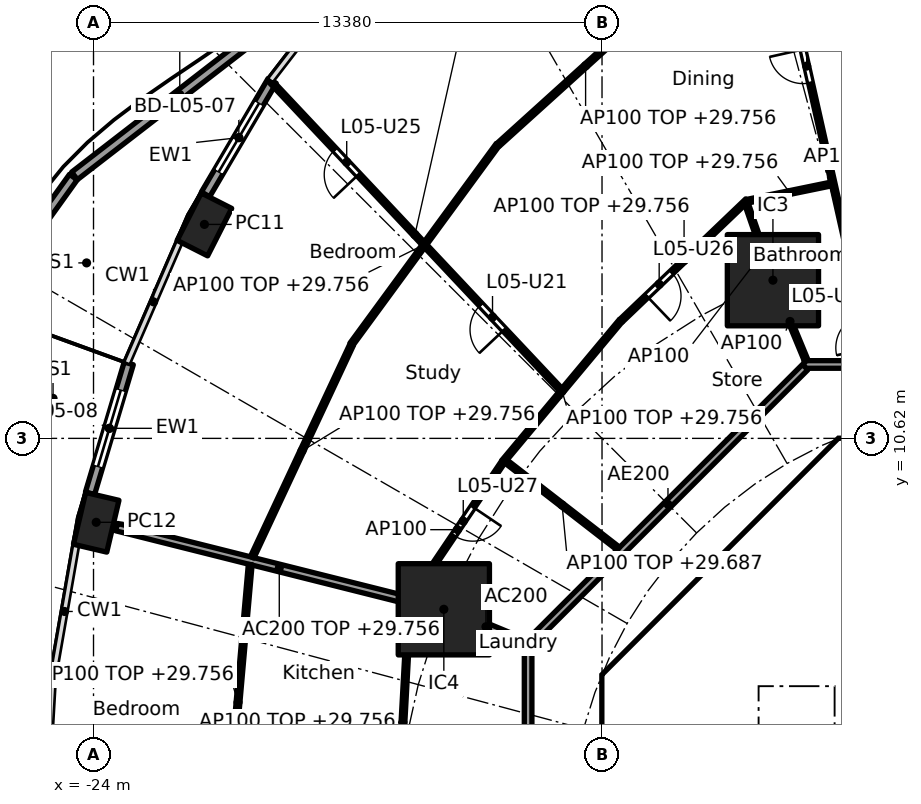
"""IFC4 building model, lengths in metres.
Left out: names, types, materials, properties, quantities, classifications, styles, units other than length and angle.
Written with IfcOpenShell. Run it as: python <this file> out.ifc"""

import sys

from ifc_helpers import new_model, si_unit, direction, frame, frame_2d, origin, origin_2d, place, context, subcontext, project, spatial, polyline, rectangle, hollow_rectangle, outline, extrude, element, fill, save


model = new_model("IFC4")
c1 = context("Model", 3, precision=1e-05, world=origin(), true_north=direction((0.0, 1.0)))
c2 = subcontext(c1, "Body", "Model", "MODEL_VIEW")
j1 = project(units=[si_unit("LENGTHUNIT", "METRE"), si_unit("PLANEANGLEUNIT", "RADIAN")], contexts=[c1])
p1 = place(None, origin())
s1 = spatial("IfcSite", under=j1, at=p1, CompositionType="ELEMENT")
p2 = place(p1, origin())
s2 = spatial("IfcBuilding", under=s1, at=p2, CompositionType="ELEMENT")
p3 = place(p2, frame((0.0, 0.0, 27.0)))
s3 = spatial("IfcBuildingStorey", under=s2, at=p3, CompositionType="ELEMENT", Elevation=27.0)
for number, where, z_axis, x_axis in (
    (1, (-21.082, 16.25, 0.0), (0.0, 0.0, 1.0), (-0.452, -0.892, 0.0)),
    (2, (-23.929, 8.412, 0.0), (0.0, 0.0, 1.0), (-0.229, -0.973, 0.0)),
):
    element("IfcColumn", number, at=place(p3, frame(where, z_axis=z_axis, x_axis=x_axis)), inside=s3, PredefinedType="COLUMN", context=c2, shape_type="SweptSolid", body=[
        extrude(hollow_rectangle(XDim=1.4, YDim=0.9, WallThickness=0.05, at=origin_2d()), origin(), (0.0, 0.0, 1.0), 3.7),
    ])
for number, where, z_axis, x_axis in (
    (3, (-6.123, 14.782, 0.0), (0.0, 0.0, 1.0), (1.0, 0.0, 0.0)),
    (4, (-14.782, 6.123, 0.0), (0.0, 0.0, 1.0), (1.0, 0.0, 0.0)),
):
    element("IfcColumn", number, at=place(p3, frame(where, z_axis=z_axis, x_axis=x_axis)), inside=s3, PredefinedType="COLUMN", context=c2, shape_type="SweptSolid", body=[
        extrude(rectangle(XDim=2.4, YDim=2.4, at=origin_2d()), origin(), (0.0, 0.0, 1.0), 3.7),
    ])
p4 = place(p3, frame((-21.052, 17.04, 0.0), z_axis=(0.0, 0.0, 1.0), x_axis=(0.506311160839, 0.862350861546, 0.0)))
e5 = element("IfcWall", 5, at=p4, inside=s3, PredefinedType="SOLIDWALL", context=c2, shape_type="SweptSolid", body=[
    extrude(rectangle(XDim=3.462, YDim=0.25, at=frame_2d((1.731, 0.0))), origin(), (0.0, 0.0, 1.0), 3.44),
])
p5 = place(p4, frame((0.681, 0.0, 0.0)))
e6 = element("IfcOpeningElement", 6, at=p5, cuts=e5, PredefinedType="OPENING", context=c2, shape_type="SweptSolid", body=[
    extrude(rectangle(XDim=2.1, YDim=2.4, at=frame_2d((1.05, 1.2))), frame((0.0, 0.135, 0.0), z_axis=(0.0, -1.0, 0.0), x_axis=(1.0, 0.0, 0.0)), (0.0, 0.0, 1.0), 0.27),
])
p6 = place(p3, frame((-24.092, 9.176, 0.0), z_axis=(0.0, 0.0, 1.0), x_axis=(0.285871309426, 0.958268018065, 0.0)))
e7 = element("IfcWall", 7, at=p6, inside=s3, PredefinedType="SOLIDWALL", context=c2, shape_type="SweptSolid", body=[
    extrude(rectangle(XDim=3.565, YDim=0.25, at=frame_2d((1.783, 0.0))), origin(), (0.0, 0.0, 1.0), 3.44),
])
p7 = place(p6, frame((0.733, 0.0, 0.0)))
e8 = element("IfcOpeningElement", 8, at=p7, cuts=e7, PredefinedType="OPENING", context=c2, shape_type="SweptSolid", body=[
    extrude(rectangle(XDim=2.1, YDim=2.4, at=frame_2d((1.05, 1.2))), frame((0.0, 0.135, 0.0), z_axis=(0.0, -1.0, 0.0), x_axis=(1.0, 0.0, 0.0)), (0.0, 0.0, 1.0), 0.27),
])
p8 = place(p3, frame((-18.961, 21.807, 0.0), z_axis=(0.0, 0.0, 1.0), x_axis=(-0.791260452579, -0.611479268811, 0.0)))
e9 = element("IfcWall", 9, at=p8, inside=s3, PredefinedType="PARAPET", context=c2, shape_type="SweptSolid", body=[
    extrude(rectangle(XDim=6.999, YDim=0.25, at=frame_2d((3.5, 0.0))), origin(), (0.0, 0.0, 1.0), 1.1),
])
p9 = place(p3, frame((-24.529, 17.496, 0.0), z_axis=(0.0, 0.0, 1.0), x_axis=(-0.58295122618, -0.812507149443, 0.0)))
e10 = element("IfcWall", 10, at=p9, inside=s3, PredefinedType="PARAPET", context=c2, shape_type="SweptSolid", body=[
    extrude(rectangle(XDim=1.616, YDim=0.25, at=frame_2d((0.808, 0.0))), origin(), (0.0, 0.0, 1.0), 1.1),
])
p10 = place(p3, frame((-4.613, 9.988, 0.0), z_axis=(0.0, 0.0, 1.0), x_axis=(-0.707106781187, -0.707106781187, 0.0)))
e11 = element("IfcWall", 11, at=p10, inside=s3, PredefinedType="SHEAR", context=c2, shape_type="SweptSolid", body=[
    extrude(rectangle(XDim=7.602, YDim=0.6, at=frame_2d((3.801, 0.0))), origin(), (0.0, 0.0, 1.0), 3.44),
])
p11 = place(p10, frame((0.351, 0.0, 0.0)))
e12 = element("IfcOpeningElement", 12, at=p11, cuts=e11, PredefinedType="OPENING", context=c2, shape_type="SweptSolid", body=[
    extrude(rectangle(XDim=1.1, YDim=2.1, at=frame_2d((0.55, 1.05))), frame((0.0, 0.31, 0.0), z_axis=(0.0, -1.0, 0.0), x_axis=(1.0, 0.0, 0.0)), (0.0, 0.0, 1.0), 0.62),
])
p12 = place(p3, frame((-10.325, 3.801, 0.0), z_axis=(0.0, 0.0, 1.0), x_axis=(0.0, -1.0, 0.0)))
e13 = element("IfcWall", 13, at=p12, inside=s3, PredefinedType="SHEAR", context=c2, shape_type="SweptSolid", body=[
    extrude(rectangle(XDim=7.602, YDim=0.6, at=frame_2d((3.801, 0.0))), origin(), (0.0, 0.0, 1.0), 3.44),
])
p13 = place(p12, frame((0.651, 0.0, 0.0)))
e14 = element("IfcOpeningElement", 14, at=p13, cuts=e13, PredefinedType="OPENING", context=c2, shape_type="SweptSolid", body=[
    extrude(rectangle(XDim=1.5, YDim=2.1, at=frame_2d((0.75, 1.05))), frame((0.0, 0.31, 0.0), z_axis=(0.0, -1.0, 0.0), x_axis=(1.0, 0.0, 0.0)), (0.0, 0.0, 1.0), 0.62),
])
p14 = place(p12, frame((5.451, 0.0, 0.0)))
e15 = element("IfcOpeningElement", 15, at=p14, cuts=e13, PredefinedType="OPENING", context=c2, shape_type="SweptSolid", body=[
    extrude(rectangle(XDim=1.5, YDim=2.1, at=frame_2d((0.75, 1.05))), frame((0.0, 0.31, 0.0), z_axis=(0.0, -1.0, 0.0), x_axis=(1.0, 0.0, 0.0)), (0.0, 0.0, 1.0), 0.62),
])
p15 = place(p3, frame((-5.8, 4.3, 0.0), z_axis=(0.0, 0.0, 1.0), x_axis=(0.0, 1.0, 0.0)))
e16 = element("IfcWall", 16, at=p15, inside=s3, PredefinedType="PARTITIONING", context=c2, shape_type="SweptSolid", body=[
    extrude(rectangle(XDim=3.927, YDim=0.15, at=frame_2d((1.963, 0.0))), origin(), (0.0, 0.0, 1.0), 3.44),
])
p16 = place(p15, frame((0.413, 0.0, 0.0)))
e17 = element("IfcOpeningElement", 17, at=p16, cuts=e16, PredefinedType="OPENING", context=c2, shape_type="SweptSolid", body=[
    extrude(rectangle(XDim=0.9, YDim=2.1, at=frame_2d((0.45, 1.05))), frame((0.0, 0.085, 0.0), z_axis=(0.0, -1.0, 0.0), x_axis=(1.0, 0.0, 0.0)), (0.0, 0.0, 1.0), 0.17),
])
p17 = place(p15, frame((2.489, 0.0, 0.0)))
e18 = element("IfcOpeningElement", 18, at=p17, cuts=e16, PredefinedType="OPENING", context=c2, shape_type="SweptSolid", body=[
    extrude(rectangle(XDim=0.9, YDim=2.1, at=frame_2d((0.45, 1.05))), frame((0.0, 0.085, 0.0), z_axis=(0.0, -1.0, 0.0), x_axis=(1.0, 0.0, 0.0)), (0.0, 0.0, 1.0), 0.17),
])
p18 = place(p3, origin())
e19 = element("IfcWall", 19, at=p18, inside=s3, PredefinedType="SHEAR", context=c2, shape_type="SweptSolid", body=[
    extrude(outline(polyline([(-10.2, 4.825), (-9.776, 4.401), (-10.025, 4.152), (-10.025, 3.801), (-10.625, 3.801), (-10.625, 4.401), (-10.2, 4.825)])), origin(), (0.0, 0.0, 1.0), 3.44),
])
p19 = place(p3, origin())
e20 = element("IfcWall", 20, at=p19, inside=s3, PredefinedType="SHEAR", context=c2, shape_type="SweptSolid", body=[
    extrude(outline(polyline([(-4.152, 10.025), (-4.401, 9.776), (-4.825, 10.2), (-4.401, 10.625), (4.401, 10.625), (4.825, 10.2), (4.401, 9.776), (4.152, 10.025), (-4.152, 10.025)])), origin(), (0.0, 0.0, 1.0), 3.44),
])
p20 = place(p3, frame((-10.025, 4.0, 0.0), z_axis=(0.0, 0.0, 1.0), x_axis=(1.0, 0.0, 0.0)))
e21 = element("IfcWall", 21, at=p20, inside=s3, PredefinedType="PARTITIONING", context=c2, shape_type="SweptSolid", body=[
    extrude(rectangle(XDim=3.325, YDim=0.2, at=frame_2d((1.662, 0.0))), origin(), (0.0, 0.0, 1.0), 3.44),
])
p21 = place(p3, frame((-8.001, 6.1, 0.0), z_axis=(0.0, 0.0, 1.0), x_axis=(1.0, 0.0, 0.0)))
e22 = element("IfcWall", 22, at=p21, inside=s3, PredefinedType="PARTITIONING", context=c2, shape_type="SweptSolid", body=[
    extrude(rectangle(XDim=2.126, YDim=0.15, at=frame_2d((1.063, 0.0))), origin(), (0.0, 0.0, 1.0), 3.44),
])
p22 = place(p3, origin())
e23 = element("IfcWall", 23, at=p22, inside=s3, PredefinedType="SOLIDWALL", context=c2, shape_type="SweptSolid", body=[
    extrude(outline(polyline([(-6.5, 2.1), (-6.7, 2.1), (-6.7, 4.3), (6.7, 4.3), (6.7, 2.1), (6.5, 2.1), (6.5, 4.1), (4.5, 4.1), (4.5, 2.1), (4.3, 2.1), (4.3, 4.1), (2.3, 4.1), (2.3, 2.1), (2.1, 2.1), (2.1, 4.1), (0.1, 4.1), (0.1, 2.1), (-0.1, 2.1), (-0.1, 4.1), (-2.1, 4.1), (-2.1, 2.1), (-2.3, 2.1), (-2.3, 4.1), (-4.3, 4.1), (-4.3, 2.1), (-4.5, 2.1), (-4.5, 4.1), (-6.5, 4.1), (-6.5, 2.1)])), origin(), (0.0, 0.0, 1.0), 3.44),
])
p23 = place(p3, frame((-12.657, 5.243, 0.0), z_axis=(0.0, 0.0, 1.0), x_axis=(-0.923885664896, 0.382668627144, 0.0)))
e24 = element("IfcWall", 24, at=p23, inside=s3, PredefinedType="PARTITIONING", context=c2, shape_type="SweptSolid", body=[
    extrude(rectangle(XDim=2.2, YDim=0.2, at=frame_2d((1.1, 0.0))), origin(), (0.0, 0.0, 1.0), 3.44),
])
p24 = place(p3, frame((-14.831, 6.135, 0.0), z_axis=(0.0, 0.0, 1.0), x_axis=(-0.969884949569, 0.243563512454, 0.0)))
e25 = element("IfcWall", 25, at=p24, inside=s3, PredefinedType="PARTITIONING", context=c2, shape_type="SweptSolid", body=[
    extrude(rectangle(XDim=8.829, YDim=0.2, at=frame_2d((4.415, 0.0))), origin(), (0.0, 0.0, 1.0), 2.756),
])
p25 = place(p3, frame((5.104, 12.565, 0.0), z_axis=(0.0, 0.0, 1.0), x_axis=(-1.0, 0.0, 0.0)))
e26 = element("IfcWall", 26, at=p25, inside=s3, PredefinedType="PARTITIONING", context=c2, shape_type="SweptSolid", body=[
    extrude(rectangle(XDim=10.409, YDim=0.2, at=frame_2d((5.205, 0.0))), origin(), (0.0, 0.0, 1.0), 3.44),
])
p26 = place(p25, frame((6.339, 0.0, 0.0)))
e27 = element("IfcOpeningElement", 27, at=p26, cuts=e26, PredefinedType="OPENING", context=c2, shape_type="SweptSolid", body=[
    extrude(rectangle(XDim=1.0, YDim=2.1, at=frame_2d((0.5, 1.05))), frame((0.0, 0.11, 0.0), z_axis=(0.0, -1.0, 0.0), x_axis=(1.0, 0.0, 0.0)), (0.0, 0.0, 1.0), 0.22),
])
p27 = place(p3, frame((-5.275, 12.494, 0.0), z_axis=(0.0, 0.0, 1.0), x_axis=(-0.707106781187, -0.707106781187, 0.0)))
e28 = element("IfcWall", 28, at=p27, inside=s3, PredefinedType="PARTITIONING", context=c2, shape_type="SweptSolid", body=[
    extrude(rectangle(XDim=10.209, YDim=0.2, at=frame_2d((5.104, 0.0))), origin(), (0.0, 0.0, 1.0), 3.44),
])
p28 = place(p3, frame((-12.565, 5.304, 0.0), z_axis=(0.0, 0.0, 1.0), x_axis=(0.0, -1.0, 0.0)))
e29 = element("IfcWall", 29, at=p28, inside=s3, PredefinedType="PARTITIONING", context=c2, shape_type="SweptSolid", body=[
    extrude(rectangle(XDim=10.409, YDim=0.2, at=frame_2d((5.205, 0.0))), origin(), (0.0, 0.0, 1.0), 3.44),
])
p29 = place(p3, frame((-3.492, 12.662, 0.0), z_axis=(0.0, 0.0, 1.0), x_axis=(-0.219268088006, 0.975664648115, 0.0)))
e30 = element("IfcWall", 30, at=p29, inside=s3, PredefinedType="PARTITIONING", context=c2, shape_type="SweptSolid", body=[
    extrude(rectangle(XDim=18.23, YDim=0.1, at=frame_2d((9.115, 0.0))), origin(), (0.0, 0.0, 1.0), 2.687),
])
p30 = place(p29, frame((0.35, 0.0, 0.0)))
e31 = element("IfcOpeningElement", 31, at=p30, cuts=e30, PredefinedType="OPENING", context=c2, shape_type="SweptSolid", body=[
    extrude(rectangle(XDim=0.9, YDim=2.1, at=frame_2d((0.45, 1.05))), frame((0.0, 0.06, 0.0), z_axis=(0.0, -1.0, 0.0), x_axis=(1.0, 0.0, 0.0)), (0.0, 0.0, 1.0), 0.12),
])
p31 = place(p29, frame((7.497, 0.0, 0.0)))
e32 = element("IfcOpeningElement", 32, at=p31, cuts=e30, PredefinedType="OPENING", context=c2, shape_type="SweptSolid", body=[
    extrude(rectangle(XDim=0.9, YDim=2.1, at=frame_2d((0.45, 1.05))), frame((0.0, 0.06, 0.0), z_axis=(0.0, -1.0, 0.0), x_axis=(1.0, 0.0, 0.0)), (0.0, 0.0, 1.0), 0.12),
])
p32 = place(p29, frame((14.223, 0.0, 0.0)))
e33 = element("IfcOpeningElement", 33, at=p32, cuts=e30, PredefinedType="OPENING", context=c2, shape_type="SweptSolid", body=[
    extrude(rectangle(XDim=0.9, YDim=2.1, at=frame_2d((0.45, 1.05))), frame((0.0, 0.06, 0.0), z_axis=(0.0, -1.0, 0.0), x_axis=(1.0, 0.0, 0.0)), (0.0, 0.0, 1.0), 0.12),
])
p33 = place(p3, frame((-4.58, 17.315, 0.0), z_axis=(0.0, 0.0, 1.0), x_axis=(-0.979581941859, -0.201045316246, 0.0)))
e34 = element("IfcWall", 34, at=p33, inside=s3, PredefinedType="PARTITIONING", context=c2, shape_type="SweptSolid", body=[
    extrude(rectangle(XDim=2.256, YDim=0.1, at=frame_2d((1.128, 0.0))), origin(), (0.0, 0.0, 1.0), 2.756),
])
p34 = place(p3, frame((-5.243, 12.657, 0.0), z_axis=(0.0, 0.0, 1.0), x_axis=(-0.382719158442, 0.923864733477, 0.0)))
e35 = element("IfcWall", 35, at=p34, inside=s3, PredefinedType="PARTITIONING", context=c2, shape_type="SweptSolid", body=[
    extrude(rectangle(XDim=2.25, YDim=0.1, at=frame_2d((1.125, 0.0))), origin(), (0.0, 0.0, 1.0), 3.44),
])
p35 = place(p3, frame((-6.139, 14.83, 0.0), z_axis=(0.0, 0.0, 1.0), x_axis=(-0.327246993321, 0.944938836837, 0.0)))
e36 = element("IfcWall", 36, at=p35, inside=s3, PredefinedType="PARTITIONING", context=c2, shape_type="SweptSolid", body=[
    extrude(rectangle(XDim=2.09, YDim=0.1, at=frame_2d((1.045, 0.0))), origin(), (0.0, 0.0, 1.0), 3.44),
])
p36 = place(p3, frame((-6.803, 16.886, 0.0), z_axis=(0.0, 0.0, 1.0), x_axis=(-0.722763212502, -0.69109575216, 0.0)))
e37 = element("IfcWall", 37, at=p36, inside=s3, PredefinedType="PARTITIONING", context=c2, shape_type="SweptSolid", body=[
    extrude(rectangle(XDim=4.587, YDim=0.1, at=frame_2d((2.293, 0.0))), origin(), (0.0, 0.0, 1.0), 2.756),
])
p37 = place(p36, frame((2.75, 0.0, 0.0)))
e38 = element("IfcOpeningElement", 38, at=p37, cuts=e37, PredefinedType="OPENING", context=c2, shape_type="SweptSolid", body=[
    extrude(rectangle(XDim=0.9, YDim=2.1, at=frame_2d((0.45, 1.05))), frame((0.0, 0.06, 0.0), z_axis=(0.0, -1.0, 0.0), x_axis=(1.0, 0.0, 0.0)), (0.0, 0.0, 1.0), 0.12),
])
p38 = place(p3, frame((-8.749, 22.508, 0.0), z_axis=(0.0, 0.0, 1.0), x_axis=(-0.741720189244, -0.670709445936, 0.0)))
e39 = element("IfcWall", 39, at=p38, inside=s3, PredefinedType="PARTITIONING", context=c2, shape_type="SweptSolid", body=[
    extrude(rectangle(XDim=6.209, YDim=0.1, at=frame_2d((3.104, 0.0))), origin(), (0.0, 0.0, 1.0), 2.756),
])
p39 = place(p3, frame((-10.123, 13.72, 0.0), z_axis=(0.0, 0.0, 1.0), x_axis=(-0.64083455704, -0.767679015282, 0.0)))
e40 = element("IfcWall", 40, at=p39, inside=s3, PredefinedType="PARTITIONING", context=c2, shape_type="SweptSolid", body=[
    extrude(rectangle(XDim=4.837, YDim=0.1, at=frame_2d((2.418, 0.0))), origin(), (0.0, 0.0, 1.0), 2.756),
])
p40 = place(p3, frame((-13.362, 18.35, 0.0), z_axis=(0.0, 0.0, 1.0), x_axis=(-0.591191311491, -0.806531359104, 0.0)))
e41 = element("IfcWall", 41, at=p40, inside=s3, PredefinedType="PARTITIONING", context=c2, shape_type="SweptSolid", body=[
    extrude(rectangle(XDim=6.51, YDim=0.1, at=frame_2d((3.255, 0.0))), origin(), (0.0, 0.0, 1.0), 2.756),
])
p41 = place(p3, frame((-11.707, 11.9, 0.0), z_axis=(0.0, 0.0, 1.0), x_axis=(-0.685030806147, 0.728514100501, 0.0)))
e42 = element("IfcWall", 42, at=p41, inside=s3, PredefinedType="PARTITIONING", context=c2, shape_type="SweptSolid", body=[
    extrude(rectangle(XDim=11.201, YDim=0.1, at=frame_2d((5.601, 0.0))), origin(), (0.0, 0.0, 1.0), 2.837),
])
p42 = place(p41, frame((2.169, 0.0, 0.0)))
e43 = element("IfcOpeningElement", 43, at=p42, cuts=e42, PredefinedType="OPENING", context=c2, shape_type="SweptSolid", body=[
    extrude(rectangle(XDim=0.9, YDim=2.1, at=frame_2d((0.45, 1.05))), frame((0.0, 0.06, 0.0), z_axis=(0.0, -1.0, 0.0), x_axis=(1.0, 0.0, 0.0)), (0.0, 0.0, 1.0), 0.12),
])
p43 = place(p41, frame((7.77, 0.0, 0.0)))
e44 = element("IfcOpeningElement", 44, at=p43, cuts=e42, PredefinedType="OPENING", context=c2, shape_type="SweptSolid", body=[
    extrude(rectangle(XDim=0.9, YDim=2.1, at=frame_2d((0.45, 1.05))), frame((0.0, 0.06, 0.0), z_axis=(0.0, -1.0, 0.0), x_axis=(1.0, 0.0, 0.0)), (0.0, 0.0, 1.0), 0.12),
])
p44 = place(p3, frame((-10.19, 7.719, 0.0), z_axis=(0.0, 0.0, 1.0), x_axis=(-0.790253294643, 0.612780327937, 0.0)))
e45 = element("IfcWall", 45, at=p44, inside=s3, PredefinedType="PARTITIONING", context=c2, shape_type="SweptSolid", body=[
    extrude(rectangle(XDim=3.746, YDim=0.1, at=frame_2d((1.873, 0.0))), origin(), (0.0, 0.0, 1.0), 2.687),
])
p45 = place(p3, frame((-13.218, 10.004, 0.0), z_axis=(0.0, 0.0, 1.0), x_axis=(-0.559112679527, -0.829091678641, 0.0)))
e46 = element("IfcWall", 46, at=p45, inside=s3, PredefinedType="PARTITIONING", context=c2, shape_type="SweptSolid", body=[
    extrude(rectangle(XDim=4.308, YDim=0.1, at=frame_2d((2.154, 0.0))), origin(), (0.0, 0.0, 1.0), 3.44),
])
p46 = place(p45, frame((1.433, 0.0, 0.0)))
e47 = element("IfcOpeningElement", 47, at=p46, cuts=e46, PredefinedType="OPENING", context=c2, shape_type="SweptSolid", body=[
    extrude(rectangle(XDim=0.9, YDim=2.1, at=frame_2d((0.45, 1.05))), frame((0.0, 0.06, 0.0), z_axis=(0.0, -1.0, 0.0), x_axis=(1.0, 0.0, 0.0)), (0.0, 0.0, 1.0), 0.12),
])
p47 = place(p3, frame((-17.203, 13.095, 0.0), z_axis=(0.0, 0.0, 1.0), x_axis=(-0.423926333401, -0.905696673202, 0.0)))
e48 = element("IfcWall", 48, at=p47, inside=s3, PredefinedType="PARTITIONING", context=c2, shape_type="SweptSolid", body=[
    extrude(rectangle(XDim=6.188, YDim=0.1, at=frame_2d((3.094, 0.0))), origin(), (0.0, 0.0, 1.0), 2.756),
])
p48 = place(p3, frame((-15.688, 6.249, 0.0), z_axis=(0.0, 0.0, 1.0), x_axis=(-0.054659814056, -0.998505034903, 0.0)))
e49 = element("IfcWall", 49, at=p48, inside=s3, PredefinedType="PARTITIONING", context=c2, shape_type="SweptSolid", body=[
    extrude(rectangle(XDim=6.208, YDim=0.1, at=frame_2d((3.104, 0.0))), origin(), (0.0, 0.0, 1.0), 2.756),
])
p49 = place(p3, frame((-19.877, 7.301, 0.0), z_axis=(0.0, 0.0, 1.0), x_axis=(-0.088143415068, -0.996107794558, 0.0)))
e50 = element("IfcWall", 50, at=p49, inside=s3, PredefinedType="PARTITIONING", context=c2, shape_type="SweptSolid", body=[
    extrude(rectangle(XDim=7.279, YDim=0.1, at=frame_2d((3.64, 0.0))), origin(), (0.0, 0.0, 1.0), 2.756),
])
p50 = place(p5, origin())
e51 = element("IfcDoor", 51, at=p50, inside=s3, OperationType="SLIDING_TO_LEFT", PredefinedType="DOOR", context=c2, shape_type="SweptSolid", body=[
    extrude(rectangle(XDim=2.1, YDim=2.4, at=frame_2d((1.05, 1.2))), frame((0.0, 0.025, 0.0), z_axis=(0.0, -1.0, 0.0), x_axis=(1.0, 0.0, 0.0)), (0.0, 0.0, 1.0), 0.05),
])
fill(e6, e51)
p51 = place(p7, origin())
e52 = element("IfcDoor", 52, at=p51, inside=s3, OperationType="SLIDING_TO_LEFT", PredefinedType="DOOR", context=c2, shape_type="SweptSolid", body=[
    extrude(rectangle(XDim=2.1, YDim=2.4, at=frame_2d((1.05, 1.2))), frame((0.0, 0.025, 0.0), z_axis=(0.0, -1.0, 0.0), x_axis=(1.0, 0.0, 0.0)), (0.0, 0.0, 1.0), 0.05),
])
fill(e8, e52)
p52 = place(p16, origin())
e53 = element("IfcDoor", 53, at=p52, inside=s3, OperationType="SINGLE_SWING_LEFT", PredefinedType="DOOR", context=c2, shape_type="SweptSolid", body=[
    extrude(rectangle(XDim=0.9, YDim=2.1, at=frame_2d((0.45, 1.05))), frame((0.0, 0.025, 0.0), z_axis=(0.0, -1.0, 0.0), x_axis=(1.0, 0.0, 0.0)), (0.0, 0.0, 1.0), 0.05),
])
fill(e17, e53)
p53 = place(p17, origin())
e54 = element("IfcDoor", 54, at=p53, inside=s3, OperationType="SINGLE_SWING_LEFT", PredefinedType="DOOR", context=c2, shape_type="SweptSolid", body=[
    extrude(rectangle(XDim=0.9, YDim=2.1, at=frame_2d((0.45, 1.05))), frame((0.0, 0.025, 0.0), z_axis=(0.0, -1.0, 0.0), x_axis=(1.0, 0.0, 0.0)), (0.0, 0.0, 1.0), 0.05),
])
fill(e18, e54)
p54 = place(p13, origin())
e55 = element("IfcDoor", 55, at=p54, inside=s3, OperationType="DOUBLE_DOOR_SINGLE_SWING", PredefinedType="DOOR", context=c2, shape_type="SweptSolid", body=[
    extrude(rectangle(XDim=1.5, YDim=2.1, at=frame_2d((0.75, 1.05))), frame((0.0, 0.025, 0.0), z_axis=(0.0, -1.0, 0.0), x_axis=(1.0, 0.0, 0.0)), (0.0, 0.0, 1.0), 0.05),
])
fill(e14, e55)
p55 = place(p11, origin())
e56 = element("IfcDoor", 56, at=p55, inside=s3, OperationType="SINGLE_SWING_LEFT", PredefinedType="DOOR", context=c2, shape_type="SweptSolid", body=[
    extrude(rectangle(XDim=1.1, YDim=2.1, at=frame_2d((0.55, 1.05))), frame((0.0, 0.025, 0.0), z_axis=(0.0, -1.0, 0.0), x_axis=(1.0, 0.0, 0.0)), (0.0, 0.0, 1.0), 0.05),
])
fill(e12, e56)
p56 = place(p31, origin())
e57 = element("IfcDoor", 57, at=p56, inside=s3, OperationType="SINGLE_SWING_RIGHT", PredefinedType="DOOR", context=c2, shape_type="SweptSolid", body=[
    extrude(rectangle(XDim=0.9, YDim=2.1, at=frame_2d((0.45, 1.05))), frame((0.0, 0.025, 0.0), z_axis=(0.0, -1.0, 0.0), x_axis=(1.0, 0.0, 0.0)), (0.0, 0.0, 1.0), 0.05),
])
fill(e32, e57)
p57 = place(p42, origin())
e58 = element("IfcDoor", 58, at=p57, inside=s3, OperationType="SINGLE_SWING_LEFT", PredefinedType="DOOR", context=c2, shape_type="SweptSolid", body=[
    extrude(rectangle(XDim=0.9, YDim=2.1, at=frame_2d((0.45, 1.05))), frame((0.0, 0.025, 0.0), z_axis=(0.0, -1.0, 0.0), x_axis=(1.0, 0.0, 0.0)), (0.0, 0.0, 1.0), 0.05),
])
fill(e43, e58)
p58 = place(p43, origin())
e59 = element("IfcDoor", 59, at=p58, inside=s3, OperationType="SINGLE_SWING_LEFT", PredefinedType="DOOR", context=c2, shape_type="SweptSolid", body=[
    extrude(rectangle(XDim=0.9, YDim=2.1, at=frame_2d((0.45, 1.05))), frame((0.0, 0.025, 0.0), z_axis=(0.0, -1.0, 0.0), x_axis=(1.0, 0.0, 0.0)), (0.0, 0.0, 1.0), 0.05),
])
fill(e44, e59)
p59 = place(p37, origin())
e60 = element("IfcDoor", 60, at=p59, inside=s3, OperationType="SINGLE_SWING_RIGHT", PredefinedType="DOOR", context=c2, shape_type="SweptSolid", body=[
    extrude(rectangle(XDim=0.9, YDim=2.1, at=frame_2d((0.45, 1.05))), frame((0.0, 0.025, 0.0), z_axis=(0.0, -1.0, 0.0), x_axis=(1.0, 0.0, 0.0)), (0.0, 0.0, 1.0), 0.05),
])
fill(e38, e60)
p60 = place(p46, origin())
e61 = element("IfcDoor", 61, at=p60, inside=s3, OperationType="SINGLE_SWING_LEFT", PredefinedType="DOOR", context=c2, shape_type="SweptSolid", body=[
    extrude(rectangle(XDim=0.9, YDim=2.1, at=frame_2d((0.45, 1.05))), frame((0.0, 0.025, 0.0), z_axis=(0.0, -1.0, 0.0), x_axis=(1.0, 0.0, 0.0)), (0.0, 0.0, 1.0), 0.05),
])
fill(e47, e61)
save(model, sys.argv[1])
